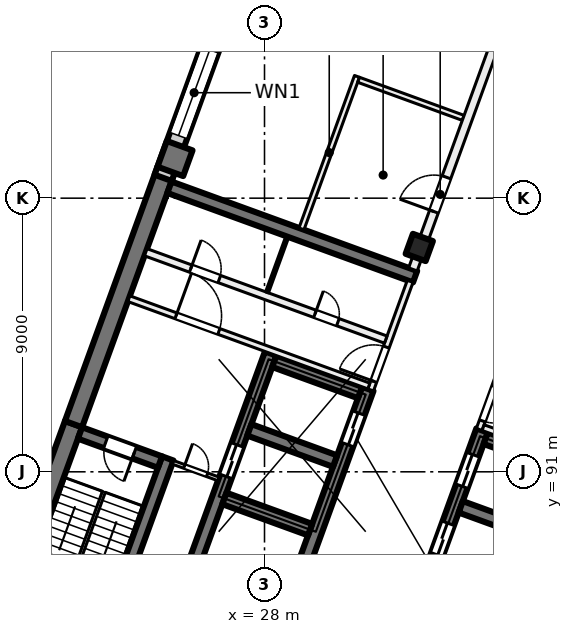
"""IFC4 building model, lengths in metres.
Left out: names, types, materials, properties, quantities, classifications, styles, units other than length and angle.
Written with IfcOpenShell. Run it as: python <this file> out.ifc"""

import sys

from ifc_helpers import new_model, si_unit, direction, frame, frame_2d, origin, origin_2d, place, context, subcontext, project, spatial, rectangle, extrude, element, fill, save


model = new_model("IFC4")
c1 = context("Model", 3, precision=1e-05, world=origin(), true_north=direction((0.0, 1.0)))
c2 = subcontext(c1, "Body", "Model", "MODEL_VIEW")
j1 = project(units=[si_unit("LENGTHUNIT", "METRE"), si_unit("PLANEANGLEUNIT", "RADIAN")], contexts=[c1])
p1 = place(None, origin())
s1 = spatial("IfcSite", under=j1, at=p1, CompositionType="ELEMENT")
p2 = place(p1, origin())
s2 = spatial("IfcBuilding", under=s1, at=p2, CompositionType="ELEMENT")
p3 = place(p2, frame((0.0, 0.0, 71.5)))
s3 = spatial("IfcBuildingStorey", under=s2, at=p3, CompositionType="ELEMENT", Elevation=71.5)
p4 = place(p3, frame((33.091, 98.379, 0.0), z_axis=(0.0, 0.0, 1.0), x_axis=(-0.342020143326, -0.939692620786, 0.0)))
e1 = element("IfcColumn", 1, at=p4, inside=s3, PredefinedType="COLUMN", context=c2, shape_type="SweptSolid", body=[
    extrude(rectangle(XDim=0.7, YDim=0.7, at=origin_2d()), origin(), (0.0, 0.0, 1.0), 4.0),
])
p5 = place(p3, frame((25.056, 101.303, 0.0), z_axis=(0.0, 0.0, 1.0), x_axis=(-0.342020143326, -0.939692620786, 0.0)))
e2 = element("IfcColumn", 2, at=p5, inside=s3, PredefinedType="COLUMN", context=c2, shape_type="SweptSolid", body=[
    extrude(rectangle(XDim=0.9, YDim=0.9, at=origin_2d()), origin(), (0.0, 0.0, 1.0), 4.0),
])
p6 = place(p3, frame((19.05, 85.239, 0.0), z_axis=(0.0, 0.0, 1.0), x_axis=(0.342016982193, 0.939693771338, 0.0)))
e3 = element("IfcWall", 3, at=p6, inside=s3, PredefinedType="SHEAR", context=c2, shape_type="SweptSolid", body=[
    extrude(rectangle(XDim=7.8, YDim=0.6, at=frame_2d((3.9, 0.0))), origin(), (0.0, 0.0, 1.0), 4.0),
])
p7 = place(p3, frame((21.717, 92.568, 0.0), z_axis=(0.0, 0.0, 1.0), x_axis=(0.342016162452, 0.939694069696, 0.0)))
e4 = element("IfcWall", 4, at=p7, inside=s3, PredefinedType="SHEAR", context=c2, shape_type="SweptSolid", body=[
    extrude(rectangle(XDim=8.9, YDim=0.6, at=frame_2d((4.45, 0.0))), origin(), (0.0, 0.0, 1.0), 4.0),
])
p8 = place(p3, frame((22.15, 84.11, 0.0), z_axis=(0.0, 0.0, 1.0), x_axis=(0.342016982193, 0.939693771338, 0.0)))
e5 = element("IfcWall", 5, at=p8, inside=s3, PredefinedType="SHEAR", context=c2, shape_type="SweptSolid", body=[
    extrude(rectangle(XDim=7.8, YDim=0.4, at=frame_2d((3.9, 0.0))), origin(), (0.0, 0.0, 1.0), 4.0),
])
p9 = place(p3, frame((24.562, 91.32, 0.0), z_axis=(0.0, 0.0, 1.0), x_axis=(-0.939717030584, 0.341953070509, 0.0)))
e6 = element("IfcWall", 6, at=p9, inside=s3, PredefinedType="SHEAR", context=c2, shape_type="SweptSolid", body=[
    extrude(rectangle(XDim=2.8, YDim=0.4, at=frame_2d((1.4, 0.0))), origin(), (0.0, 0.0, 1.0), 4.0),
])
p10 = place(p9, frame((0.9, 0.0, 0.0)))
e7 = element("IfcOpeningElement", 7, at=p10, cuts=e6, PredefinedType="OPENING", context=c2, shape_type="SweptSolid", body=[
    extrude(rectangle(XDim=1.0, YDim=2.1, at=frame_2d((0.5, 1.05))), frame((0.0, 0.21, 0.0), z_axis=(0.0, -1.0, 0.0), x_axis=(1.0, 0.0, 0.0)), (0.0, 0.0, 1.0), 0.42),
])
p11 = place(p3, frame((30.984, 80.895, 0.0), z_axis=(0.0, 0.0, 1.0), x_axis=(0.342021021735, 0.939692301071, 0.0)))
e8 = element("IfcWall", 8, at=p11, inside=s3, PredefinedType="SHEAR", context=c2, shape_type="SweptSolid", body=[
    extrude(rectangle(XDim=12.2, YDim=0.4, at=frame_2d((6.1, 0.0))), origin(), (0.0, 0.0, 1.0), 4.0),
])
p12 = place(p11, frame((5.45, 0.0, 0.0)))
e9 = element("IfcOpeningElement", 9, at=p12, cuts=e8, PredefinedType="OPENING", context=c2, shape_type="SweptSolid", body=[
    extrude(rectangle(XDim=1.1, YDim=2.1, at=frame_2d((0.55, 1.05))), frame((0.0, 0.21, 0.0), z_axis=(0.0, -1.0, 0.0), x_axis=(1.0, 0.0, 0.0)), (0.0, 0.0, 1.0), 0.42),
])
p13 = place(p11, frame((7.85, 0.0, 0.0)))
e10 = element("IfcOpeningElement", 10, at=p13, cuts=e8, PredefinedType="OPENING", context=c2, shape_type="SweptSolid", body=[
    extrude(rectangle(XDim=1.1, YDim=2.1, at=frame_2d((0.55, 1.05))), frame((0.0, 0.21, 0.0), z_axis=(0.0, -1.0, 0.0), x_axis=(1.0, 0.0, 0.0)), (0.0, 0.0, 1.0), 0.42),
])
p14 = place(p11, frame((10.25, 0.0, 0.0)))
e11 = element("IfcOpeningElement", 11, at=p14, cuts=e8, PredefinedType="OPENING", context=c2, shape_type="SweptSolid", body=[
    extrude(rectangle(XDim=1.1, YDim=2.1, at=frame_2d((0.55, 1.05))), frame((0.0, 0.21, 0.0), z_axis=(0.0, -1.0, 0.0), x_axis=(1.0, 0.0, 0.0)), (0.0, 0.0, 1.0), 0.42),
])
p15 = place(p3, frame((34.178, 79.732, 0.0), z_axis=(0.0, 0.0, 1.0), x_axis=(0.342014590177, 0.939694641948, 0.0)))
e12 = element("IfcWall", 12, at=p15, inside=s3, PredefinedType="SHEAR", context=c2, shape_type="SweptSolid", body=[
    extrude(rectangle(XDim=12.2, YDim=0.4, at=frame_2d((6.1, 0.0))), origin(), (0.0, 0.0, 1.0), 4.0),
])
p16 = place(p3, frame((37.274, 88.822, 0.0), z_axis=(0.0, 0.0, 1.0), x_axis=(-0.939686455819, 0.342037080957, 0.0)))
e13 = element("IfcWall", 13, at=p16, inside=s3, PredefinedType="SHEAR", context=c2, shape_type="SweptSolid", body=[
    extrude(rectangle(XDim=3.0, YDim=0.4, at=frame_2d((1.5, 0.0))), origin(), (0.0, 0.0, 1.0), 4.0),
])
p17 = place(p3, frame((38.095, 91.077, 0.0), z_axis=(0.0, 0.0, 1.0), x_axis=(-0.939676934218, 0.342063238742, 0.0)))
e14 = element("IfcWall", 14, at=p17, inside=s3, PredefinedType="SHEAR", context=c2, shape_type="SweptSolid", body=[
    extrude(rectangle(XDim=3.0, YDim=0.4, at=frame_2d((1.5, 0.0))), origin(), (0.0, 0.0, 1.0), 4.0),
])
p18 = place(p3, frame((27.225, 82.263, 0.0), z_axis=(0.0, 0.0, 1.0), x_axis=(0.342014590177, 0.939694641948, 0.0)))
e15 = element("IfcWall", 15, at=p18, inside=s3, PredefinedType="SHEAR", context=c2, shape_type="SweptSolid", body=[
    extrude(rectangle(XDim=12.2, YDim=0.4, at=frame_2d((6.1, 0.0))), origin(), (0.0, 0.0, 1.0), 4.0),
])
p19 = place(p18, frame((10.25, 0.0, 0.0)))
e16 = element("IfcOpeningElement", 16, at=p19, cuts=e15, PredefinedType="OPENING", context=c2, shape_type="SweptSolid", body=[
    extrude(rectangle(XDim=1.1, YDim=2.1, at=frame_2d((0.55, 1.05))), frame((0.0, 0.21, 0.0), z_axis=(0.0, -1.0, 0.0), x_axis=(1.0, 0.0, 0.0)), (0.0, 0.0, 1.0), 0.42),
])
p20 = place(p18, frame((0.7, 0.0, 0.0)))
e17 = element("IfcOpeningElement", 17, at=p20, cuts=e15, PredefinedType="OPENING", context=c2, shape_type="SweptSolid", body=[
    extrude(rectangle(XDim=0.8, YDim=2.1, at=frame_2d((0.4, 1.05))), frame((0.0, 0.21, 0.0), z_axis=(0.0, -1.0, 0.0), x_axis=(1.0, 0.0, 0.0)), (0.0, 0.0, 1.0), 0.42),
])
p21 = place(p3, frame((24.03, 83.426, 0.0), z_axis=(0.0, 0.0, 1.0), x_axis=(0.342014590177, 0.939694641948, 0.0)))
e18 = element("IfcWall", 18, at=p21, inside=s3, PredefinedType="SHEAR", context=c2, shape_type="SweptSolid", body=[
    extrude(rectangle(XDim=12.2, YDim=0.4, at=frame_2d((6.1, 0.0))), origin(), (0.0, 0.0, 1.0), 4.0),
])
p22 = place(p21, frame((7.9, 0.0, 0.0)))
e19 = element("IfcOpeningElement", 19, at=p22, cuts=e18, PredefinedType="OPENING", context=c2, shape_type="SweptSolid", body=[
    extrude(rectangle(XDim=1.1, YDim=2.1, at=frame_2d((0.55, 1.05))), frame((0.0, 0.21, 0.0), z_axis=(0.0, -1.0, 0.0), x_axis=(1.0, 0.0, 0.0)), (0.0, 0.0, 1.0), 0.42),
])
for number, where, z_axis, x_axis in (
    (20, (29.5, 89.097, 0.0), (0.0, 0.0, 1.0), (-0.94, 0.342, 0.0)),
    (21, (30.32, 91.353, 0.0), (0.0, 0.0, 1.0), (-0.94, 0.342, 0.0)),
    (22, (31.141, 93.608, 0.0), (0.0, 0.0, 1.0), (-0.94, 0.342, 0.0)),
):
    element("IfcWall", number, at=place(p3, frame(where, z_axis=z_axis, x_axis=x_axis)), inside=s3, PredefinedType="SHEAR", context=c2, shape_type="SweptSolid", body=[
        extrude(rectangle(XDim=3.0, YDim=0.4, at=frame_2d((1.5, 0.0))), origin(), (0.0, 0.0, 1.0), 4.0),
    ])
p23 = place(p3, frame((32.953, 97.418, 0.0), z_axis=(0.0, 0.0, 1.0), x_axis=(-0.93969060187, 0.342025690201, 0.0)))
e23 = element("IfcWall", 23, at=p23, inside=s3, PredefinedType="SHEAR", context=c2, shape_type="SweptSolid", body=[
    extrude(rectangle(XDim=8.6, YDim=0.4, at=frame_2d((4.3, 0.0))), origin(), (0.0, 0.0, 1.0), 4.0),
])
p24 = place(p3, frame((24.666, 100.669, 0.0), z_axis=(0.0, 0.0, 1.0), x_axis=(0.34201964167, 0.939692803373, 0.0)))
e24 = element("IfcWall", 24, at=p24, inside=s3, PredefinedType="SOLIDWALL", context=c2, shape_type="SweptSolid", body=[
    extrude(rectangle(XDim=32.884, YDim=0.6, at=frame_2d((16.442, 0.0))), origin(), (0.0, 0.0, 1.0), 3.625),
])
p25 = place(p24, frame((1.48, 0.0, 0.9)))
e25 = element("IfcOpeningElement", 25, at=p25, cuts=e24, PredefinedType="OPENING", context=c2, shape_type="SweptSolid", body=[
    extrude(rectangle(XDim=3.0, YDim=2.4, at=frame_2d((1.5, 1.2))), frame((0.0, 0.31, 0.0), z_axis=(0.0, -1.0, 0.0), x_axis=(1.0, 0.0, 0.0)), (0.0, 0.0, 1.0), 0.62),
])
p26 = place(p24, frame((5.98, 0.0, 0.9)))
e26 = element("IfcOpeningElement", 26, at=p26, cuts=e24, PredefinedType="OPENING", context=c2, shape_type="SweptSolid", body=[
    extrude(rectangle(XDim=3.0, YDim=2.4, at=frame_2d((1.5, 1.2))), frame((0.0, 0.31, 0.0), z_axis=(0.0, -1.0, 0.0), x_axis=(1.0, 0.0, 0.0)), (0.0, 0.0, 1.0), 0.62),
])
p27 = place(p24, frame((10.48, 0.0, 0.9)))
e27 = element("IfcOpeningElement", 27, at=p27, cuts=e24, PredefinedType="OPENING", context=c2, shape_type="SweptSolid", body=[
    extrude(rectangle(XDim=3.0, YDim=2.4, at=frame_2d((1.5, 1.2))), frame((0.0, 0.31, 0.0), z_axis=(0.0, -1.0, 0.0), x_axis=(1.0, 0.0, 0.0)), (0.0, 0.0, 1.0), 0.62),
])
p28 = place(p24, frame((14.98, 0.0, 0.9)))
e28 = element("IfcOpeningElement", 28, at=p28, cuts=e24, PredefinedType="OPENING", context=c2, shape_type="SweptSolid", body=[
    extrude(rectangle(XDim=3.0, YDim=2.4, at=frame_2d((1.5, 1.2))), frame((0.0, 0.31, 0.0), z_axis=(0.0, -1.0, 0.0), x_axis=(1.0, 0.0, 0.0)), (0.0, 0.0, 1.0), 0.62),
])
p29 = place(p24, frame((19.48, 0.0, 0.9)))
e29 = element("IfcOpeningElement", 29, at=p29, cuts=e24, PredefinedType="OPENING", context=c2, shape_type="SweptSolid", body=[
    extrude(rectangle(XDim=3.0, YDim=2.4, at=frame_2d((1.5, 1.2))), frame((0.0, 0.31, 0.0), z_axis=(0.0, -1.0, 0.0), x_axis=(1.0, 0.0, 0.0)), (0.0, 0.0, 1.0), 0.62),
])
p30 = place(p24, frame((23.98, 0.0, 0.9)))
e30 = element("IfcOpeningElement", 30, at=p30, cuts=e24, PredefinedType="OPENING", context=c2, shape_type="SweptSolid", body=[
    extrude(rectangle(XDim=3.0, YDim=2.4, at=frame_2d((1.5, 1.2))), frame((0.0, 0.31, 0.0), z_axis=(0.0, -1.0, 0.0), x_axis=(1.0, 0.0, 0.0)), (0.0, 0.0, 1.0), 0.62),
])
p31 = place(p24, frame((28.48, 0.0, 0.9)))
e31 = element("IfcOpeningElement", 31, at=p31, cuts=e24, PredefinedType="OPENING", context=c2, shape_type="SweptSolid", body=[
    extrude(rectangle(XDim=3.0, YDim=2.4, at=frame_2d((1.5, 1.2))), frame((0.0, 0.31, 0.0), z_axis=(0.0, -1.0, 0.0), x_axis=(1.0, 0.0, 0.0)), (0.0, 0.0, 1.0), 0.62),
])
p32 = place(p3, frame((31.491, 93.693, 0.0), z_axis=(0.0, 0.0, 1.0), x_axis=(0.341995824804, 0.939701471648, 0.0)))
e32 = element("IfcWall", 32, at=p32, inside=s3, PredefinedType="PARTITIONING", context=c2, shape_type="SweptSolid", body=[
    extrude(rectangle(XDim=3.8, YDim=0.2, at=frame_2d((1.9, 0.0))), origin(), (0.0, 0.0, 1.0), 3.625),
])
p33 = place(p32, frame((0.3, 0.0, 0.0)))
e33 = element("IfcOpeningElement", 33, at=p33, cuts=e32, PredefinedType="OPENING", context=c2, shape_type="SweptSolid", body=[
    extrude(rectangle(XDim=1.2, YDim=2.1, at=frame_2d((0.6, 1.05))), frame((0.0, 0.11, 0.0), z_axis=(0.0, -1.0, 0.0), x_axis=(1.0, 0.0, 0.0)), (0.0, 0.0, 1.0), 0.22),
])
p34 = place(p3, frame((23.538, 96.694, 0.0), z_axis=(0.0, 0.0, 1.0), x_axis=(0.939691552312, -0.342023078919, 0.0)))
e34 = element("IfcWall", 34, at=p34, inside=s3, PredefinedType="PARTITIONING", context=c2, shape_type="SweptSolid", body=[
    extrude(rectangle(XDim=8.4, YDim=0.2, at=frame_2d((4.2, 0.0))), origin(), (0.0, 0.0, 1.0), 3.625),
])
p35 = place(p34, frame((1.65, 0.0, 0.0)))
e35 = element("IfcOpeningElement", 35, at=p35, cuts=e34, PredefinedType="OPENING", context=c2, shape_type="SweptSolid", body=[
    extrude(rectangle(XDim=1.5, YDim=2.1, at=frame_2d((0.75, 1.05))), frame((0.0, 0.11, 0.0), z_axis=(0.0, -1.0, 0.0), x_axis=(1.0, 0.0, 0.0)), (0.0, 0.0, 1.0), 0.22),
])
p36 = place(p3, frame((24.094, 98.221, 0.0), z_axis=(0.0, 0.0, 1.0), x_axis=(0.939691552312, -0.342023078919, 0.0)))
e36 = element("IfcWall", 36, at=p36, inside=s3, PredefinedType="PARTITIONING", context=c2, shape_type="SweptSolid", body=[
    extrude(rectangle(XDim=8.4, YDim=0.25, at=frame_2d((4.2, 0.0))), origin(), (0.0, 0.0, 1.0), 3.625),
])
p37 = place(p36, frame((5.925, 0.0, 0.0)))
e37 = element("IfcOpeningElement", 37, at=p37, cuts=e36, PredefinedType="OPENING", context=c2, shape_type="SweptSolid", body=[
    extrude(rectangle(XDim=0.8, YDim=2.1, at=frame_2d((0.4, 1.05))), frame((0.0, 0.135, 0.0), z_axis=(0.0, -1.0, 0.0), x_axis=(1.0, 0.0, 0.0)), (0.0, 0.0, 1.0), 0.27),
])
p38 = place(p36, frame((1.575, 0.0, 0.0)))
e38 = element("IfcOpeningElement", 38, at=p38, cuts=e36, PredefinedType="OPENING", context=c2, shape_type="SweptSolid", body=[
    extrude(rectangle(XDim=1.0, YDim=2.1, at=frame_2d((0.5, 1.05))), frame((0.0, 0.135, 0.0), z_axis=(0.0, -1.0, 0.0), x_axis=(1.0, 0.0, 0.0)), (0.0, 0.0, 1.0), 0.27),
])
p39 = place(p3, frame((24.985, 91.312, 0.0), z_axis=(0.0, 0.0, 1.0), x_axis=(0.939708740826, -0.341975850632, 0.0)))
e39 = element("IfcWall", 39, at=p39, inside=s3, PredefinedType="PARTITIONING", context=c2, shape_type="SweptSolid", body=[
    extrude(rectangle(XDim=1.6, YDim=0.125, at=frame_2d((0.8, 0.0))), origin(), (0.0, 0.0, 1.0), 3.625),
])
p40 = place(p39, frame((0.4, 0.0, 0.0)))
e40 = element("IfcOpeningElement", 40, at=p40, cuts=e39, PredefinedType="OPENING", context=c2, shape_type="SweptSolid", body=[
    extrude(rectangle(XDim=0.8, YDim=2.1, at=frame_2d((0.4, 1.05))), frame((0.0, 0.073, 0.0), z_axis=(0.0, -1.0, 0.0), x_axis=(1.0, 0.0, 0.0)), (0.0, 0.0, 1.0), 0.145),
])
p41 = place(p3, frame((28.083, 96.902, 0.0), z_axis=(0.0, 0.0, 1.0), x_axis=(0.342024501273, 0.939691034611, 0.0)))
e41 = element("IfcWall", 41, at=p41, inside=s3, PredefinedType="PARTITIONING", context=c2, shape_type="SweptSolid", body=[
    extrude(rectangle(XDim=1.95, YDim=0.1, at=frame_2d((0.975, 0.0))), origin(), (0.0, 0.0, 1.0), 3.625),
])
p42 = place(p3, frame((36.362, 95.964, 0.0), z_axis=(0.0, 0.0, 1.0), x_axis=(-0.341995824804, -0.939701471648, 0.0)))
e42 = element("IfcWall", 42, at=p42, inside=s3, PredefinedType="PARTITIONING", context=c2, shape_type="SweptSolid", body=[
    extrude(rectangle(XDim=3.8, YDim=0.2, at=frame_2d((1.9, 0.0))), origin(), (0.0, 0.0, 1.0), 3.625),
])
p43 = place(p42, frame((2.3, 0.0, 0.0)))
e43 = element("IfcOpeningElement", 43, at=p43, cuts=e42, PredefinedType="OPENING", context=c2, shape_type="SweptSolid", body=[
    extrude(rectangle(XDim=1.2, YDim=2.1, at=frame_2d((0.6, 1.05))), frame((0.0, 0.11, 0.0), z_axis=(0.0, -1.0, 0.0), x_axis=(1.0, 0.0, 0.0)), (0.0, 0.0, 1.0), 0.22),
])
p44 = place(p3, frame((35.19, 92.453, 0.0), z_axis=(0.0, 0.0, 1.0), x_axis=(0.939691552312, -0.342023078919, 0.0)))
e44 = element("IfcWall", 44, at=p44, inside=s3, PredefinedType="PARTITIONING", context=c2, shape_type="SweptSolid", body=[
    extrude(rectangle(XDim=8.4, YDim=0.2, at=frame_2d((4.2, 0.0))), origin(), (0.0, 0.0, 1.0), 3.625),
])
p45 = place(p44, frame((5.25, 0.0, 0.0)))
e45 = element("IfcOpeningElement", 45, at=p45, cuts=e44, PredefinedType="OPENING", context=c2, shape_type="SweptSolid", body=[
    extrude(rectangle(XDim=1.5, YDim=2.1, at=frame_2d((0.75, 1.05))), frame((0.0, 0.11, 0.0), z_axis=(0.0, -1.0, 0.0), x_axis=(1.0, 0.0, 0.0)), (0.0, 0.0, 1.0), 0.22),
])
p46 = place(p3, frame((29.216, 98.991, 0.0), z_axis=(0.0, 0.0, 1.0), x_axis=(0.342113991093, 0.939658457685, 0.0)))
e46 = element("IfcWall", 46, at=p46, inside=s3, PredefinedType="PARTITIONING", context=c2, shape_type="SweptSolid", body=[
    extrude(rectangle(XDim=5.337, YDim=0.175, at=frame_2d((2.668, 0.0))), origin(), (0.0, 0.0, 1.0), 3.625),
])
p47 = place(p3, frame((31.094, 103.894, 0.0), z_axis=(0.0, 0.0, 1.0), x_axis=(0.939676603928, -0.342064146075, 0.0)))
e47 = element("IfcWall", 47, at=p47, inside=s3, PredefinedType="PARTITIONING", context=c2, shape_type="SweptSolid", body=[
    extrude(rectangle(XDim=3.663, YDim=0.175, at=frame_2d((1.832, 0.0))), origin(), (0.0, 0.0, 1.0), 3.625),
])
p48 = place(p3, frame((32.881, 97.657, 0.0), z_axis=(0.0, 0.0, 1.0), x_axis=(0.342017360004, 0.939693633828, 0.0)))
e48 = element("IfcWall", 48, at=p48, inside=s3, PredefinedType="PARTITIONING", context=c2, shape_type="SweptSolid", body=[
    extrude(rectangle(XDim=34.516, YDim=0.3, at=frame_2d((17.258, 0.0))), origin(), (0.0, 0.0, 1.0), 3.625),
])
p49 = place(p48, frame((2.025, 0.0, 0.0)))
e49 = element("IfcOpeningElement", 49, at=p49, cuts=e48, PredefinedType="OPENING", context=c2, shape_type="SweptSolid", body=[
    extrude(rectangle(XDim=1.2, YDim=2.1, at=frame_2d((0.6, 1.05))), frame((0.0, 0.16, 0.0), z_axis=(0.0, -1.0, 0.0), x_axis=(1.0, 0.0, 0.0)), (0.0, 0.0, 1.0), 0.32),
])
p50 = place(p48, frame((15.6, 0.0, 0.0)))
e50 = element("IfcOpeningElement", 50, at=p50, cuts=e48, PredefinedType="OPENING", context=c2, shape_type="SweptSolid", body=[
    extrude(rectangle(XDim=1.8, YDim=2.1, at=frame_2d((0.9, 1.05))), frame((0.0, 0.16, 0.0), z_axis=(0.0, -1.0, 0.0), x_axis=(1.0, 0.0, 0.0)), (0.0, 0.0, 1.0), 0.32),
])
p51 = place(p25, origin())
e51 = element("IfcWindow", 51, at=p51, inside=s3, PartitioningType="SINGLE_PANEL", PredefinedType="WINDOW", context=c2, shape_type="SweptSolid", body=[
    extrude(rectangle(XDim=3.0, YDim=2.4, at=frame_2d((1.5, 1.2))), frame((0.0, 0.03, 0.0), z_axis=(0.0, -1.0, 0.0), x_axis=(1.0, 0.0, 0.0)), (0.0, 0.0, 1.0), 0.06),
])
fill(e25, e51)
p52 = place(p19, origin())
e52 = element("IfcDoor", 52, at=p52, inside=s3, OperationType="DOUBLE_DOOR_SLIDING", PredefinedType="DOOR", context=c2, shape_type="SweptSolid", body=[
    extrude(rectangle(XDim=1.1, YDim=2.1, at=frame_2d((0.55, 1.05))), frame((0.0, 0.025, 0.0), z_axis=(0.0, -1.0, 0.0), x_axis=(1.0, 0.0, 0.0)), (0.0, 0.0, 1.0), 0.05),
])
fill(e16, e52)
p53 = place(p13, origin())
e53 = element("IfcDoor", 53, at=p53, inside=s3, OperationType="DOUBLE_DOOR_SLIDING", PredefinedType="DOOR", context=c2, shape_type="SweptSolid", body=[
    extrude(rectangle(XDim=1.1, YDim=2.1, at=frame_2d((0.55, 1.05))), frame((0.0, 0.025, 0.0), z_axis=(0.0, -1.0, 0.0), x_axis=(1.0, 0.0, 0.0)), (0.0, 0.0, 1.0), 0.05),
])
fill(e10, e53)
p54 = place(p14, origin())
e54 = element("IfcDoor", 54, at=p54, inside=s3, OperationType="DOUBLE_DOOR_SLIDING", PredefinedType="DOOR", context=c2, shape_type="SweptSolid", body=[
    extrude(rectangle(XDim=1.1, YDim=2.1, at=frame_2d((0.55, 1.05))), frame((0.0, 0.025, 0.0), z_axis=(0.0, -1.0, 0.0), x_axis=(1.0, 0.0, 0.0)), (0.0, 0.0, 1.0), 0.05),
])
fill(e11, e54)
p55 = place(p33, origin())
e55 = element("IfcDoor", 55, at=p55, inside=s3, OperationType="DOUBLE_DOOR_SINGLE_SWING", PredefinedType="DOOR", context=c2, shape_type="SweptSolid", body=[
    extrude(rectangle(XDim=1.2, YDim=2.1, at=frame_2d((0.6, 1.05))), frame((0.0, 0.025, 0.0), z_axis=(0.0, -1.0, 0.0), x_axis=(1.0, 0.0, 0.0)), (0.0, 0.0, 1.0), 0.05),
])
fill(e33, e55)
p56 = place(p35, origin())
e56 = element("IfcDoor", 56, at=p56, inside=s3, OperationType="DOUBLE_DOOR_SINGLE_SWING", PredefinedType="DOOR", context=c2, shape_type="SweptSolid", body=[
    extrude(rectangle(XDim=1.5, YDim=2.1, at=frame_2d((0.75, 1.05))), frame((0.0, 0.025, 0.0), z_axis=(0.0, -1.0, 0.0), x_axis=(1.0, 0.0, 0.0)), (0.0, 0.0, 1.0), 0.05),
])
fill(e35, e56)
p57 = place(p10, origin())
e57 = element("IfcDoor", 57, at=p57, inside=s3, OperationType="SINGLE_SWING_LEFT", PredefinedType="DOOR", context=c2, shape_type="SweptSolid", body=[
    extrude(rectangle(XDim=1.0, YDim=2.1, at=frame_2d((0.5, 1.05))), frame((0.0, 0.025, 0.0), z_axis=(0.0, -1.0, 0.0), x_axis=(1.0, 0.0, 0.0)), (0.0, 0.0, 1.0), 0.05),
])
fill(e7, e57)
p58 = place(p40, origin())
e58 = element("IfcDoor", 58, at=p58, inside=s3, OperationType="SINGLE_SWING_RIGHT", PredefinedType="DOOR", context=c2, shape_type="SweptSolid", body=[
    extrude(rectangle(XDim=0.8, YDim=2.1, at=frame_2d((0.4, 1.05))), frame((0.0, 0.025, 0.0), z_axis=(0.0, -1.0, 0.0), x_axis=(1.0, 0.0, 0.0)), (0.0, 0.0, 1.0), 0.05),
])
fill(e40, e58)
p59 = place(p37, origin())
e59 = element("IfcDoor", 59, at=p59, inside=s3, OperationType="SINGLE_SWING_LEFT", PredefinedType="DOOR", context=c2, shape_type="SweptSolid", body=[
    extrude(rectangle(XDim=0.8, YDim=2.1, at=frame_2d((0.4, 1.05))), frame((0.0, 0.025, 0.0), z_axis=(0.0, -1.0, 0.0), x_axis=(1.0, 0.0, 0.0)), (0.0, 0.0, 1.0), 0.05),
])
fill(e37, e59)
p60 = place(p38, origin())
e60 = element("IfcDoor", 60, at=p60, inside=s3, OperationType="SINGLE_SWING_RIGHT", PredefinedType="DOOR", context=c2, shape_type="SweptSolid", body=[
    extrude(rectangle(XDim=1.0, YDim=2.1, at=frame_2d((0.5, 1.05))), frame((0.0, 0.025, 0.0), z_axis=(0.0, -1.0, 0.0), x_axis=(1.0, 0.0, 0.0)), (0.0, 0.0, 1.0), 0.05),
])
fill(e38, e60)
p61 = place(p43, origin())
e61 = element("IfcDoor", 61, at=p61, inside=s3, OperationType="DOUBLE_DOOR_SINGLE_SWING", PredefinedType="DOOR", context=c2, shape_type="SweptSolid", body=[
    extrude(rectangle(XDim=1.2, YDim=2.1, at=frame_2d((0.6, 1.05))), frame((0.0, 0.025, 0.0), z_axis=(0.0, -1.0, 0.0), x_axis=(1.0, 0.0, 0.0)), (0.0, 0.0, 1.0), 0.05),
])
fill(e43, e61)
p62 = place(p22, origin())
e62 = element("IfcDoor", 62, at=p62, inside=s3, OperationType="DOUBLE_DOOR_SLIDING", PredefinedType="DOOR", context=c2, shape_type="SweptSolid", body=[
    extrude(rectangle(XDim=1.1, YDim=2.1, at=frame_2d((0.55, 1.05))), frame((0.0, 0.025, 0.0), z_axis=(0.0, -1.0, 0.0), x_axis=(1.0, 0.0, 0.0)), (0.0, 0.0, 1.0), 0.05),
])
fill(e19, e62)
p63 = place(p49, origin())
e63 = element("IfcDoor", 63, at=p63, inside=s3, OperationType="DOUBLE_DOOR_SINGLE_SWING", PredefinedType="DOOR", context=c2, shape_type="SweptSolid", body=[
    extrude(rectangle(XDim=1.2, YDim=2.1, at=frame_2d((0.6, 1.05))), frame((0.0, 0.025, 0.0), z_axis=(0.0, -1.0, 0.0), x_axis=(1.0, 0.0, 0.0)), (0.0, 0.0, 1.0), 0.05),
])
fill(e49, e63)
save(model, sys.argv[1])
